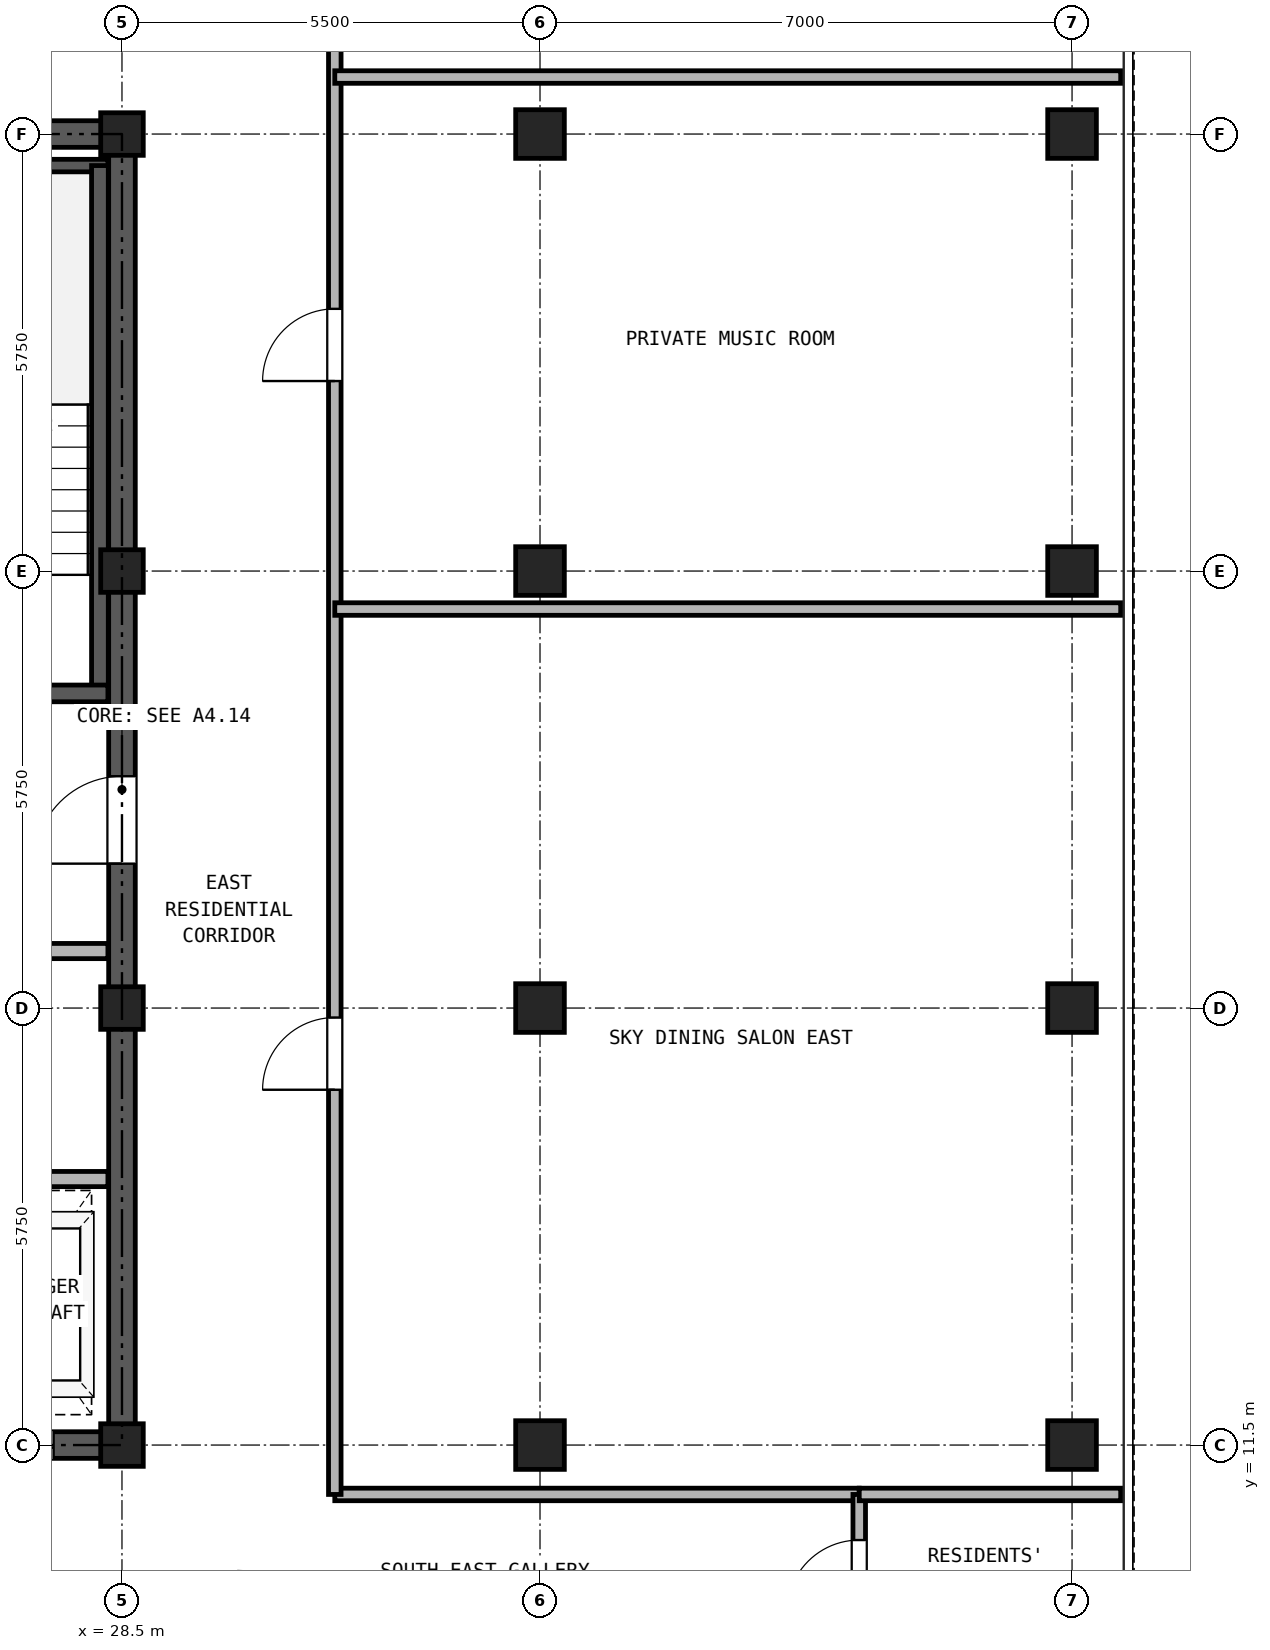
"""IFC4 building model, lengths in metres.
Left out: names, types, materials, properties, quantities, classifications, styles, units other than length and angle.
Written with IfcOpenShell. Run it as: python <this file> out.ifc"""

import sys

from ifc_helpers import new_model, si_unit, direction, frame, frame_2d, origin, origin_2d, place, context, subcontext, project, spatial, rectangle, hollow_rectangle, extrude, source, transform, mapped, element, fill, save


model = new_model("IFC4")
c1 = context("Model", 3, precision=1e-05, world=origin(), true_north=direction((0.0, 1.0)))
c2 = subcontext(c1, "Body", "Model", "MODEL_VIEW")
j1 = project(units=[si_unit("LENGTHUNIT", "METRE"), si_unit("PLANEANGLEUNIT", "RADIAN")], contexts=[c1])
p1 = place(None, origin())
s1 = spatial("IfcSite", under=j1, at=p1, CompositionType="ELEMENT")
p2 = place(p1, origin())
s2 = spatial("IfcBuilding", under=s1, at=p2, CompositionType="ELEMENT")
p3 = place(p2, frame((0.0, 0.0, 258.5)))
s3 = spatial("IfcBuildingStorey", under=s2, at=p3, CompositionType="ELEMENT", Elevation=258.5)
m1 = source(origin(), c2, "Body", "SweptSolid", [
    extrude(hollow_rectangle(XDim=0.64, YDim=0.64, WallThickness=0.035, at=origin_2d()), origin(), (0.0, 0.0, 1.0), 2.98),
])
for number, where, z_axis, x_axis in (
    (1, (41.0, 11.5, 0.0), (0.0, 0.0, 1.0), (1.0, 0.0, 0.0)),
    (2, (41.0, 17.25, 0.0), (0.0, 0.0, 1.0), (1.0, 0.0, 0.0)),
    (3, (41.0, 23.0, 0.0), (0.0, 0.0, 1.0), (1.0, 0.0, 0.0)),
    (4, (41.0, 28.75, 0.0), (0.0, 0.0, 1.0), (1.0, 0.0, 0.0)),
):
    element("IfcColumn", number, at=place(p3, frame(where, z_axis=z_axis, x_axis=x_axis)), inside=s3, PredefinedType="COLUMN", context=c2, shape_type="MappedRepresentation", body=[
        mapped(m1, transform((0.0, 0.0, 0.0), x_axis=(1.0, 0.0, 0.0), y_axis=(0.0, 1.0, 0.0), z_axis=(0.0, 0.0, 1.0), scale=1.0)),
    ])
m2 = source(origin(), c2, "Body", "SweptSolid", [
    extrude(hollow_rectangle(XDim=0.56, YDim=0.56, WallThickness=0.03, at=origin_2d()), origin(), (0.0, 0.0, 1.0), 2.98),
])
for number, where, z_axis, x_axis in (
    (5, (28.5, 11.5, 0.0), (0.0, 0.0, 1.0), (1.0, 0.0, 0.0)),
    (6, (28.5, 17.25, 0.0), (0.0, 0.0, 1.0), (1.0, 0.0, 0.0)),
    (7, (28.5, 23.0, 0.0), (0.0, 0.0, 1.0), (1.0, 0.0, 0.0)),
    (8, (28.5, 28.75, 0.0), (0.0, 0.0, 1.0), (1.0, 0.0, 0.0)),
):
    element("IfcColumn", number, at=place(p3, frame(where, z_axis=z_axis, x_axis=x_axis)), inside=s3, PredefinedType="COLUMN", context=c2, shape_type="MappedRepresentation", body=[
        mapped(m2, transform((0.0, 0.0, 0.0), x_axis=(1.0, 0.0, 0.0), y_axis=(0.0, 1.0, 0.0), z_axis=(0.0, 0.0, 1.0), scale=1.0)),
    ])
for number, where, z_axis, x_axis in (
    (9, (34.0, 11.5, 0.0), (0.0, 0.0, 1.0), (1.0, 0.0, 0.0)),
    (10, (34.0, 17.25, 0.0), (0.0, 0.0, 1.0), (1.0, 0.0, 0.0)),
    (11, (34.0, 23.0, 0.0), (0.0, 0.0, 1.0), (1.0, 0.0, 0.0)),
    (12, (34.0, 28.75, 0.0), (0.0, 0.0, 1.0), (1.0, 0.0, 0.0)),
):
    element("IfcColumn", number, at=place(p3, frame(where, z_axis=z_axis, x_axis=x_axis)), inside=s3, PredefinedType="COLUMN", context=c2, shape_type="MappedRepresentation", body=[
        mapped(m1, transform((0.0, 0.0, 0.0), x_axis=(1.0, 0.0, 0.0), y_axis=(0.0, 1.0, 0.0), z_axis=(0.0, 0.0, 1.0), scale=1.0)),
    ])
p4 = place(p3, frame((18.325, 11.5, 0.0), z_axis=(0.0, 0.0, 1.0), x_axis=(1.0, 0.0, 0.0)))
e13 = element("IfcWall", 13, at=p4, inside=s3, PredefinedType="SHEAR", context=c2, shape_type="SweptSolid", body=[
    extrude(rectangle(XDim=10.35, YDim=0.35, at=frame_2d((5.175, 0.0))), origin(), (0.0, 0.0, 1.0), 2.98),
])
p5 = place(p4, frame((1.775, 0.0, 0.0)))
e14 = element("IfcOpeningElement", 14, at=p5, cuts=e13, PredefinedType="OPENING", context=c2, shape_type="SweptSolid", body=[
    extrude(rectangle(XDim=0.95, YDim=2.15, at=frame_2d((0.475, 1.075))), frame((0.0, 0.185, 0.0), z_axis=(0.0, -1.0, 0.0), x_axis=(1.0, 0.0, 0.0)), (0.0, 0.0, 1.0), 0.37),
])
p6 = place(p4, frame((5.275, 0.0, 0.0)))
e15 = element("IfcOpeningElement", 15, at=p6, cuts=e13, PredefinedType="OPENING", context=c2, shape_type="SweptSolid", body=[
    extrude(rectangle(XDim=0.95, YDim=2.15, at=frame_2d((0.475, 1.075))), frame((0.0, 0.185, 0.0), z_axis=(0.0, -1.0, 0.0), x_axis=(1.0, 0.0, 0.0)), (0.0, 0.0, 1.0), 0.37),
])
p7 = place(p4, frame((8.175, 0.0, 0.0)))
e16 = element("IfcOpeningElement", 16, at=p7, cuts=e13, PredefinedType="OPENING", context=c2, shape_type="SweptSolid", body=[
    extrude(rectangle(XDim=1.1, YDim=2.25, at=frame_2d((0.55, 1.125))), frame((0.0, 0.185, 0.0), z_axis=(0.0, -1.0, 0.0), x_axis=(1.0, 0.0, 0.0)), (0.0, 0.0, 1.0), 0.37),
])
p8 = place(p3, frame((18.325, 28.75, 0.0), z_axis=(0.0, 0.0, 1.0), x_axis=(1.0, 0.0, 0.0)))
e17 = element("IfcWall", 17, at=p8, inside=s3, PredefinedType="SHEAR", context=c2, shape_type="SweptSolid", body=[
    extrude(rectangle(XDim=10.35, YDim=0.35, at=frame_2d((5.175, 0.0))), origin(), (0.0, 0.0, 1.0), 2.98),
])
p9 = place(p8, frame((4.055, 0.0, 0.0)))
e18 = element("IfcOpeningElement", 18, at=p9, cuts=e17, PredefinedType="OPENING", context=c2, shape_type="SweptSolid", body=[
    extrude(rectangle(XDim=0.9, YDim=2.05, at=frame_2d((0.45, 1.025))), frame((0.0, 0.185, 0.0), z_axis=(0.0, -1.0, 0.0), x_axis=(1.0, 0.0, 0.0)), (0.0, 0.0, 1.0), 0.37),
])
p10 = place(p8, frame((5.595, 0.0, 0.0)))
e19 = element("IfcOpeningElement", 19, at=p10, cuts=e17, PredefinedType="OPENING", context=c2, shape_type="SweptSolid", body=[
    extrude(rectangle(XDim=0.9, YDim=2.05, at=frame_2d((0.45, 1.025))), frame((0.0, 0.185, 0.0), z_axis=(0.0, -1.0, 0.0), x_axis=(1.0, 0.0, 0.0)), (0.0, 0.0, 1.0), 0.37),
])
p11 = place(p3, frame((28.5, 11.675, 0.0), z_axis=(0.0, 0.0, 1.0), x_axis=(0.0, 1.0, 0.0)))
e20 = element("IfcWall", 20, at=p11, inside=s3, PredefinedType="SHEAR", context=c2, shape_type="SweptSolid", body=[
    extrude(rectangle(XDim=16.9, YDim=0.35, at=frame_2d((8.45, 0.0))), origin(), (0.0, 0.0, 1.0), 2.98),
])
p12 = place(p11, frame((7.475, 0.0, 0.0)))
e21 = element("IfcOpeningElement", 21, at=p12, cuts=e20, PredefinedType="OPENING", context=c2, shape_type="SweptSolid", body=[
    extrude(rectangle(XDim=1.15, YDim=2.2, at=frame_2d((0.575, 1.1))), frame((0.0, 0.185, 0.0), z_axis=(0.0, -1.0, 0.0), x_axis=(1.0, 0.0, 0.0)), (0.0, 0.0, 1.0), 0.37),
])
p13 = place(p3, frame((25.13, 28.335, 0.0), z_axis=(0.0, 0.0, 1.0), x_axis=(1.0, 0.0, 0.0)))
e22 = element("IfcWall", 22, at=p13, inside=s3, PredefinedType="PARTITIONING", context=c2, shape_type="SweptSolid", body=[
    extrude(rectangle(XDim=3.185, YDim=0.165, at=frame_2d((1.593, 0.0))), origin(), (0.0, 0.0, 1.0), 2.98),
])
p14 = place(p3, frame((28.21, 21.39, 0.0), z_axis=(0.0, 0.0, 1.0), x_axis=(0.0, 1.0, 0.0)))
e23 = element("IfcWall", 23, at=p14, inside=s3, PredefinedType="SOLIDWALL", context=c2, shape_type="SweptSolid", body=[
    extrude(rectangle(XDim=6.945, YDim=0.22, at=frame_2d((3.473, 0.0))), origin(), (0.0, 0.0, 1.0), 2.98),
])
p15 = place(p3, frame((25.13, 21.39, 0.0), z_axis=(0.0, 0.0, 1.0), x_axis=(1.0, 0.0, 0.0)))
e24 = element("IfcWall", 24, at=p15, inside=s3, PredefinedType="SOLIDWALL", context=c2, shape_type="SweptSolid", body=[
    extrude(rectangle(XDim=3.185, YDim=0.22, at=frame_2d((1.593, 0.0))), origin(), (0.0, 0.0, 1.0), 2.98),
])
p16 = place(p15, frame((0.92, 0.0, 0.0)))
e25 = element("IfcOpeningElement", 25, at=p16, cuts=e24, PredefinedType="OPENING", context=c2, shape_type="SweptSolid", body=[
    extrude(rectangle(XDim=1.15, YDim=2.2, at=frame_2d((0.575, 1.1))), frame((0.0, 0.12, 0.0), z_axis=(0.0, -1.0, 0.0), x_axis=(1.0, 0.0, 0.0)), (0.0, 0.0, 1.0), 0.24),
])
p17 = place(p3, frame((18.685, 18.0, 0.0), z_axis=(0.0, 0.0, 1.0), x_axis=(1.0, 0.0, 0.0)))
e26 = element("IfcWall", 26, at=p17, inside=s3, PredefinedType="PARTITIONING", context=c2, shape_type="SweptSolid", body=[
    extrude(rectangle(XDim=9.63, YDim=0.2, at=frame_2d((4.815, 0.0))), origin(), (0.0, 0.0, 1.0), 2.98),
])
p18 = place(p17, frame((0.565, 0.0, 0.0)))
e27 = element("IfcOpeningElement", 27, at=p18, cuts=e26, PredefinedType="OPENING", context=c2, shape_type="SweptSolid", body=[
    extrude(rectangle(XDim=1.3, YDim=2.3, at=frame_2d((0.65, 1.15))), frame((0.0, 0.11, 0.0), z_axis=(0.0, -1.0, 0.0), x_axis=(1.0, 0.0, 0.0)), (0.0, 0.0, 1.0), 0.22),
])
p19 = place(p17, frame((2.665, 0.0, 0.0)))
e28 = element("IfcOpeningElement", 28, at=p19, cuts=e26, PredefinedType="OPENING", context=c2, shape_type="SweptSolid", body=[
    extrude(rectangle(XDim=1.3, YDim=2.3, at=frame_2d((0.65, 1.15))), frame((0.0, 0.11, 0.0), z_axis=(0.0, -1.0, 0.0), x_axis=(1.0, 0.0, 0.0)), (0.0, 0.0, 1.0), 0.22),
])
p20 = place(p17, frame((7.165, 0.0, 0.0)))
e29 = element("IfcOpeningElement", 29, at=p20, cuts=e26, PredefinedType="OPENING", context=c2, shape_type="SweptSolid", body=[
    extrude(rectangle(XDim=1.0, YDim=2.15, at=frame_2d((0.5, 1.075))), frame((0.0, 0.11, 0.0), z_axis=(0.0, -1.0, 0.0), x_axis=(1.0, 0.0, 0.0)), (0.0, 0.0, 1.0), 0.22),
])
p21 = place(p3, frame((18.685, 15.0, 0.0), z_axis=(0.0, 0.0, 1.0), x_axis=(1.0, 0.0, 0.0)))
e30 = element("IfcWall", 30, at=p21, inside=s3, PredefinedType="PARTITIONING", context=c2, shape_type="SweptSolid", body=[
    extrude(rectangle(XDim=9.63, YDim=0.2, at=frame_2d((4.815, 0.0))), origin(), (0.0, 0.0, 1.0), 2.98),
])
p22 = place(p3, frame((31.3, 10.85, 0.0), z_axis=(0.0, 0.0, 1.0), x_axis=(1.0, 0.0, 0.0)))
e31 = element("IfcWall", 31, at=p22, inside=s3, PredefinedType="PARTITIONING", context=c2, shape_type="SweptSolid", body=[
    extrude(rectangle(XDim=6.9, YDim=0.165, at=frame_2d((3.45, 0.0))), origin(), (0.0, 0.0, 1.0), 2.98),
])
p23 = place(p3, frame((38.2, 8.85, 0.0), z_axis=(0.0, 0.0, 1.0), x_axis=(0.0, 1.0, 0.0)))
e32 = element("IfcWall", 32, at=p23, inside=s3, PredefinedType="PARTITIONING", context=c2, shape_type="SweptSolid", body=[
    extrude(rectangle(XDim=2.0, YDim=0.165, at=frame_2d((1.0, 0.0))), origin(), (0.0, 0.0, 1.0), 2.98),
])
p24 = place(p23, frame((0.45, 0.0, 0.0)))
e33 = element("IfcOpeningElement", 33, at=p24, cuts=e32, PredefinedType="OPENING", context=c2, shape_type="SweptSolid", body=[
    extrude(rectangle(XDim=0.95, YDim=2.15, at=frame_2d((0.475, 1.075))), frame((0.0, 0.093, 0.0), z_axis=(0.0, -1.0, 0.0), x_axis=(1.0, 0.0, 0.0)), (0.0, 0.0, 1.0), 0.185),
])
p25 = place(p3, frame((31.3, 10.85, 0.0), z_axis=(0.0, 0.0, 1.0), x_axis=(0.0, 1.0, 0.0)))
e34 = element("IfcWall", 34, at=p25, inside=s3, PredefinedType="PARTITIONING", context=c2, shape_type="SweptSolid", body=[
    extrude(rectangle(XDim=24.29, YDim=0.165, at=frame_2d((12.145, 0.0))), origin(), (0.0, 0.0, 1.0), 2.98),
])
p26 = place(p25, frame((5.325, 0.0, 0.0)))
e35 = element("IfcOpeningElement", 35, at=p26, cuts=e34, PredefinedType="OPENING", context=c2, shape_type="SweptSolid", body=[
    extrude(rectangle(XDim=0.95, YDim=2.15, at=frame_2d((0.475, 1.075))), frame((0.0, 0.093, 0.0), z_axis=(0.0, -1.0, 0.0), x_axis=(1.0, 0.0, 0.0)), (0.0, 0.0, 1.0), 0.185),
])
p27 = place(p25, frame((14.65, 0.0, 0.0)))
e36 = element("IfcOpeningElement", 36, at=p27, cuts=e34, PredefinedType="OPENING", context=c2, shape_type="SweptSolid", body=[
    extrude(rectangle(XDim=0.95, YDim=2.15, at=frame_2d((0.475, 1.075))), frame((0.0, 0.093, 0.0), z_axis=(0.0, -1.0, 0.0), x_axis=(1.0, 0.0, 0.0)), (0.0, 0.0, 1.0), 0.185),
])
p28 = place(p25, frame((20.97, 0.0, 0.0)))
e37 = element("IfcOpeningElement", 37, at=p28, cuts=e34, PredefinedType="OPENING", context=c2, shape_type="SweptSolid", body=[
    extrude(rectangle(XDim=0.95, YDim=2.15, at=frame_2d((0.475, 1.075))), frame((0.0, 0.093, 0.0), z_axis=(0.0, -1.0, 0.0), x_axis=(1.0, 0.0, 0.0)), (0.0, 0.0, 1.0), 0.185),
])
p29 = place(p3, frame((38.2, 10.85, 0.0), z_axis=(0.0, 0.0, 1.0), x_axis=(1.0, 0.0, 0.0)))
e38 = element("IfcWall", 38, at=p29, inside=s3, PredefinedType="PARTITIONING", context=c2, shape_type="SweptSolid", body=[
    extrude(rectangle(XDim=3.44, YDim=0.165, at=frame_2d((1.72, 0.0))), origin(), (0.0, 0.0, 1.0), 2.98),
])
for number, where, z_axis, x_axis in (
    (39, (31.3, 22.5, 0.0), (0.0, 0.0, 1.0), (1.0, 0.0, 0.0)),
    (40, (31.3, 29.5, 0.0), (0.0, 0.0, 1.0), (1.0, 0.0, 0.0)),
):
    element("IfcWall", number, at=place(p3, frame(where, z_axis=z_axis, x_axis=x_axis)), inside=s3, PredefinedType="PARTITIONING", context=c2, shape_type="SweptSolid", body=[
        extrude(rectangle(XDim=10.34, YDim=0.165, at=frame_2d((5.17, 0.0))), origin(), (0.0, 0.0, 1.0), 2.98),
    ])
p30 = place(p12, origin())
e41 = element("IfcDoor", 41, at=p30, inside=s3, OperationType="SINGLE_SWING_LEFT", PredefinedType="DOOR", context=c2, shape_type="SweptSolid", body=[
    extrude(rectangle(XDim=1.15, YDim=2.2, at=frame_2d((0.575, 1.1))), frame((0.0, 0.025, 0.0), z_axis=(0.0, -1.0, 0.0), x_axis=(1.0, 0.0, 0.0)), (0.0, 0.0, 1.0), 0.05),
])
fill(e21, e41)
p31 = place(p7, frame((1.1, 0.0, 0.0), z_axis=(0.0, 0.0, 1.0), x_axis=(-1.0, 0.0, 0.0)))
e42 = element("IfcDoor", 42, at=p31, inside=s3, OperationType="DOUBLE_DOOR_SLIDING", PredefinedType="DOOR", context=c2, shape_type="SweptSolid", body=[
    extrude(rectangle(XDim=1.1, YDim=2.25, at=frame_2d((0.55, 1.125))), frame((0.0, 0.025, 0.0), z_axis=(0.0, -1.0, 0.0), x_axis=(1.0, 0.0, 0.0)), (0.0, 0.0, 1.0), 0.05),
])
fill(e16, e42)
p32 = place(p24, origin())
e43 = element("IfcDoor", 43, at=p32, inside=s3, OperationType="SINGLE_SWING_LEFT", PredefinedType="DOOR", context=c2, shape_type="SweptSolid", body=[
    extrude(rectangle(XDim=0.95, YDim=2.15, at=frame_2d((0.475, 1.075))), frame((0.0, 0.025, 0.0), z_axis=(0.0, -1.0, 0.0), x_axis=(1.0, 0.0, 0.0)), (0.0, 0.0, 1.0), 0.05),
])
fill(e33, e43)
p33 = place(p26, origin())
e44 = element("IfcDoor", 44, at=p33, inside=s3, OperationType="SINGLE_SWING_LEFT", PredefinedType="DOOR", context=c2, shape_type="SweptSolid", body=[
    extrude(rectangle(XDim=0.95, YDim=2.15, at=frame_2d((0.475, 1.075))), frame((0.0, 0.025, 0.0), z_axis=(0.0, -1.0, 0.0), x_axis=(1.0, 0.0, 0.0)), (0.0, 0.0, 1.0), 0.05),
])
fill(e35, e44)
p34 = place(p27, origin())
e45 = element("IfcDoor", 45, at=p34, inside=s3, OperationType="SINGLE_SWING_LEFT", PredefinedType="DOOR", context=c2, shape_type="SweptSolid", body=[
    extrude(rectangle(XDim=0.95, YDim=2.15, at=frame_2d((0.475, 1.075))), frame((0.0, 0.025, 0.0), z_axis=(0.0, -1.0, 0.0), x_axis=(1.0, 0.0, 0.0)), (0.0, 0.0, 1.0), 0.05),
])
fill(e36, e45)
save(model, sys.argv[1])
